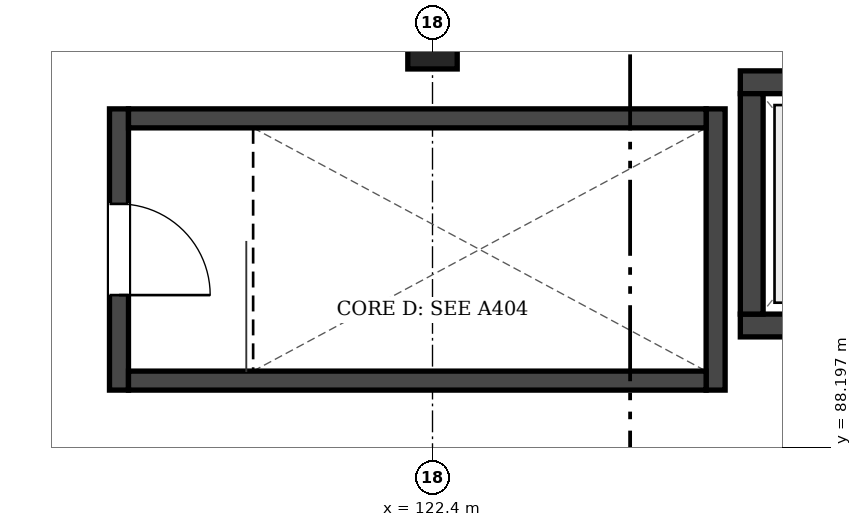
"""IFC4 building model, lengths in metres.
Left out: names, types, materials, properties, quantities, classifications, styles, units other than length and angle.
Written with IfcOpenShell. Run it as: python <this file> out.ifc"""

import sys

from ifc_helpers import new_model, si_unit, direction, frame, frame_2d, origin, origin_2d, place, context, subcontext, project, spatial, rectangle, extrude, element, fill, save


model = new_model("IFC4")
c1 = context("Model", 3, precision=1e-05, world=origin(), true_north=direction((0.0, 1.0)))
c2 = subcontext(c1, "Body", "Model", "MODEL_VIEW")
j1 = project(units=[si_unit("LENGTHUNIT", "METRE"), si_unit("PLANEANGLEUNIT", "RADIAN")], contexts=[c1])
p1 = place(None, origin())
s1 = spatial("IfcSite", under=j1, at=p1, CompositionType="ELEMENT")
p2 = place(p1, origin())
s2 = spatial("IfcBuilding", under=s1, at=p2, CompositionType="ELEMENT")
p3 = place(p2, frame((0.0, 0.0, 9.6)))
s3 = spatial("IfcBuildingStorey", under=s2, at=p3, CompositionType="ELEMENT", Elevation=9.6)
p4 = place(p3, frame((122.4, 93.6, 0.0), z_axis=(0.0, 0.0, 1.0), x_axis=(1.0, 0.0, 0.0)))
e1 = element("IfcColumn", 1, at=p4, inside=s3, PredefinedType="COLUMN", context=c2, shape_type="SweptSolid", body=[
    extrude(rectangle(XDim=0.65, YDim=0.85, at=origin_2d()), origin(), (0.0, 0.0, 1.0), 4.8),
])
p5 = place(p3, frame((126.45, 89.8, 0.0), z_axis=(0.0, 0.0, 1.0), x_axis=(1.0, 0.0, 0.0)))
e2 = element("IfcWall", 2, at=p5, inside=s3, PredefinedType="SHEAR", context=c2, shape_type="SweptSolid", body=[
    extrude(rectangle(XDim=2.9, YDim=0.3, at=frame_2d((1.45, 0.0))), origin(), (0.0, 0.0, 1.0), 5.79),
])
p6 = place(p5, frame((0.75, 0.0, 0.0)))
e3 = element("IfcOpeningElement", 3, at=p6, cuts=e2, PredefinedType="OPENING", context=c2, shape_type="SweptSolid", body=[
    extrude(rectangle(XDim=1.4, YDim=2.2, at=frame_2d((0.7, 1.1))), frame((0.0, 0.162, 0.0), z_axis=(0.0, -1.0, 0.0), x_axis=(1.0, 0.0, 0.0)), (0.0, 0.0, 1.0), 0.324),
])
for number, where, z_axis, x_axis in (
    (4, (126.45, 93.0, 0.0), (0.0, 0.0, 1.0), (1.0, 0.0, 0.0)),
    (5, (126.6, 89.95, 0.0), (0.0, 0.0, 1.0), (0.0, 1.0, 0.0)),
):
    element("IfcWall", number, at=place(p3, frame(where, z_axis=z_axis, x_axis=x_axis)), inside=s3, PredefinedType="SHEAR", context=c2, shape_type="SweptSolid", body=[
        extrude(rectangle(XDim=2.9, YDim=0.3, at=frame_2d((1.45, 0.0))), origin(), (0.0, 0.0, 1.0), 5.79),
    ])
p7 = place(p3, frame((118.275, 88.95, 0.0), z_axis=(0.0, 0.0, 1.0), x_axis=(0.0, 1.0, 0.0)))
e6 = element("IfcWall", 6, at=p7, inside=s3, PredefinedType="SHEAR", context=c2, shape_type="SweptSolid", body=[
    extrude(rectangle(XDim=3.7, YDim=0.25, at=frame_2d((1.85, 0.0))), origin(), (0.0, 0.0, 1.0), 4.55),
])
p8 = place(p7, frame((1.25, 0.0, 0.0)))
e7 = element("IfcOpeningElement", 7, at=p8, cuts=e6, PredefinedType="OPENING", context=c2, shape_type="SweptSolid", body=[
    extrude(rectangle(XDim=1.2, YDim=2.15, at=frame_2d((0.6, 1.075))), frame((0.0, 0.137, 0.0), z_axis=(0.0, -1.0, 0.0), x_axis=(1.0, 0.0, 0.0)), (0.0, 0.0, 1.0), 0.274),
])
p9 = place(p3, frame((126.125, 88.95, 0.0), z_axis=(0.0, 0.0, 1.0), x_axis=(0.0, 1.0, 0.0)))
e8 = element("IfcWall", 8, at=p9, inside=s3, PredefinedType="SHEAR", context=c2, shape_type="SweptSolid", body=[
    extrude(rectangle(XDim=3.7, YDim=0.25, at=frame_2d((1.85, 0.0))), origin(), (0.0, 0.0, 1.0), 4.55),
])
for number, where, z_axis, x_axis in (
    (9, (118.4, 89.075, 0.0), (0.0, 0.0, 1.0), (1.0, 0.0, 0.0)),
    (10, (118.4, 92.525, 0.0), (0.0, 0.0, 1.0), (1.0, 0.0, 0.0)),
):
    element("IfcWall", number, at=place(p3, frame(where, z_axis=z_axis, x_axis=x_axis)), inside=s3, PredefinedType="SHEAR", context=c2, shape_type="SweptSolid", body=[
        extrude(rectangle(XDim=7.6, YDim=0.25, at=frame_2d((3.8, 0.0))), origin(), (0.0, 0.0, 1.0), 4.55),
    ])
p10 = place(p8, frame((1.2, 0.0, 0.0), z_axis=(0.0, 0.0, 1.0), x_axis=(-1.0, 0.0, 0.0)))
e11 = element("IfcDoor", 11, at=p10, inside=s3, OperationType="SINGLE_SWING_RIGHT", PredefinedType="DOOR", context=c2, shape_type="SweptSolid", body=[
    extrude(rectangle(XDim=1.2, YDim=2.15, at=frame_2d((0.6, 1.075))), frame((0.0, 0.025, 0.0), z_axis=(0.0, -1.0, 0.0), x_axis=(1.0, 0.0, 0.0)), (0.0, 0.0, 1.0), 0.05),
])
fill(e7, e11)
save(model, sys.argv[1])
